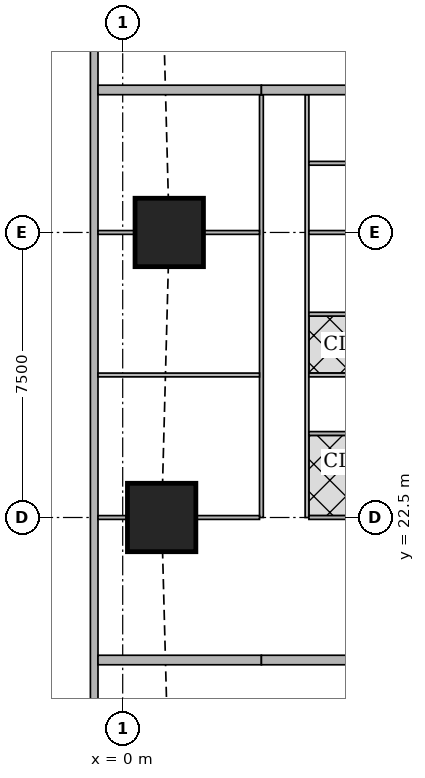
"""IFC4 building model, lengths in metres.
Left out: names, types, materials, properties, quantities, classifications, styles, units other than length and angle.
Written with IfcOpenShell. Run it as: python <this file> out.ifc"""

import sys

from ifc_helpers import new_model, si_unit, direction, frame, frame_2d, origin, origin_2d, place, context, subcontext, project, spatial, rectangle, extrude, element, fill, save


model = new_model("IFC4")
c1 = context("Model", 3, precision=1e-05, world=origin(), true_north=direction((0.0, 1.0)))
c2 = subcontext(c1, "Body", "Model", "MODEL_VIEW")
j1 = project(units=[si_unit("LENGTHUNIT", "METRE"), si_unit("PLANEANGLEUNIT", "RADIAN")], contexts=[c1])
p1 = place(None, origin())
s1 = spatial("IfcSite", under=j1, at=p1, CompositionType="ELEMENT")
p2 = place(p1, origin())
s2 = spatial("IfcBuilding", under=s1, at=p2, CompositionType="ELEMENT")
p3 = place(p2, frame((0.0, 0.0, 147.05)))
s3 = spatial("IfcBuildingStorey", under=s2, at=p3, CompositionType="ELEMENT", Elevation=147.05)
for number, where, z_axis, x_axis in (
    (1, (1.025, 22.5, 0.0), (0.0, 0.0, 1.0), (1.0, 0.0, 0.0)),
    (2, (1.225, 30.0, 0.0), (0.0, 0.0, 1.0), (1.0, 0.0, 0.0)),
):
    element("IfcColumn", number, at=place(p3, frame(where, z_axis=z_axis, x_axis=x_axis)), inside=s3, PredefinedType="COLUMN", context=c2, shape_type="SweptSolid", body=[
        extrude(rectangle(XDim=1.8, YDim=1.8, at=origin_2d()), origin(), (0.0, 0.0, 1.0), 3.75),
    ])
p4 = place(p3, frame((-0.75, 42.837, 0.0), z_axis=(0.0, 0.0, 1.0), x_axis=(0.0, -1.0, 0.0)))
e3 = element("IfcWall", 3, at=p4, inside=s3, PredefinedType="SOLIDWALL", context=c2, shape_type="SweptSolid", body=[
    extrude(rectangle(XDim=40.674, YDim=0.2, at=frame_2d((20.337, 0.0))), origin(), (0.0, 0.0, 1.0), 3.5),
])
p5 = place(p4, frame((1.78, 0.0, 0.9)))
e4 = element("IfcOpeningElement", 4, at=p5, cuts=e3, PredefinedType="OPENING", context=c2, shape_type="SweptSolid", body=[
    extrude(rectangle(XDim=1.8, YDim=1.5, at=frame_2d((0.9, 0.75))), frame((0.0, 0.11, 0.0), z_axis=(0.0, -1.0, 0.0), x_axis=(1.0, 0.0, 0.0)), (0.0, 0.0, 1.0), 0.22),
])
p6 = place(p4, frame((6.312, 0.0, 0.9)))
e5 = element("IfcOpeningElement", 5, at=p6, cuts=e3, PredefinedType="OPENING", context=c2, shape_type="SweptSolid", body=[
    extrude(rectangle(XDim=1.8, YDim=1.5, at=frame_2d((0.9, 0.75))), frame((0.0, 0.11, 0.0), z_axis=(0.0, -1.0, 0.0), x_axis=(1.0, 0.0, 0.0)), (0.0, 0.0, 1.0), 0.22),
])
p7 = place(p4, frame((10.062, 0.0, 0.9)))
e6 = element("IfcOpeningElement", 6, at=p7, cuts=e3, PredefinedType="OPENING", context=c2, shape_type="SweptSolid", body=[
    extrude(rectangle(XDim=1.8, YDim=1.5, at=frame_2d((0.9, 0.75))), frame((0.0, 0.11, 0.0), z_axis=(0.0, -1.0, 0.0), x_axis=(1.0, 0.0, 0.0)), (0.0, 0.0, 1.0), 0.22),
])
p8 = place(p4, frame((13.812, 0.0, 0.9)))
e7 = element("IfcOpeningElement", 7, at=p8, cuts=e3, PredefinedType="OPENING", context=c2, shape_type="SweptSolid", body=[
    extrude(rectangle(XDim=1.8, YDim=1.5, at=frame_2d((0.9, 0.75))), frame((0.0, 0.11, 0.0), z_axis=(0.0, -1.0, 0.0), x_axis=(1.0, 0.0, 0.0)), (0.0, 0.0, 1.0), 0.22),
])
p9 = place(p4, frame((17.562, 0.0, 0.9)))
e8 = element("IfcOpeningElement", 8, at=p9, cuts=e3, PredefinedType="OPENING", context=c2, shape_type="SweptSolid", body=[
    extrude(rectangle(XDim=1.8, YDim=1.5, at=frame_2d((0.9, 0.75))), frame((0.0, 0.11, 0.0), z_axis=(0.0, -1.0, 0.0), x_axis=(1.0, 0.0, 0.0)), (0.0, 0.0, 1.0), 0.22),
])
p10 = place(p4, frame((21.312, 0.0, 0.9)))
e9 = element("IfcOpeningElement", 9, at=p10, cuts=e3, PredefinedType="OPENING", context=c2, shape_type="SweptSolid", body=[
    extrude(rectangle(XDim=1.8, YDim=1.5, at=frame_2d((0.9, 0.75))), frame((0.0, 0.11, 0.0), z_axis=(0.0, -1.0, 0.0), x_axis=(1.0, 0.0, 0.0)), (0.0, 0.0, 1.0), 0.22),
])
p11 = place(p4, frame((25.062, 0.0, 0.9)))
e10 = element("IfcOpeningElement", 10, at=p11, cuts=e3, PredefinedType="OPENING", context=c2, shape_type="SweptSolid", body=[
    extrude(rectangle(XDim=1.8, YDim=1.5, at=frame_2d((0.9, 0.75))), frame((0.0, 0.11, 0.0), z_axis=(0.0, -1.0, 0.0), x_axis=(1.0, 0.0, 0.0)), (0.0, 0.0, 1.0), 0.22),
])
p12 = place(p4, frame((28.812, 0.0, 0.9)))
e11 = element("IfcOpeningElement", 11, at=p12, cuts=e3, PredefinedType="OPENING", context=c2, shape_type="SweptSolid", body=[
    extrude(rectangle(XDim=1.8, YDim=1.5, at=frame_2d((0.9, 0.75))), frame((0.0, 0.11, 0.0), z_axis=(0.0, -1.0, 0.0), x_axis=(1.0, 0.0, 0.0)), (0.0, 0.0, 1.0), 0.22),
])
p13 = place(p4, frame((32.562, 0.0, 0.9)))
e12 = element("IfcOpeningElement", 12, at=p13, cuts=e3, PredefinedType="OPENING", context=c2, shape_type="SweptSolid", body=[
    extrude(rectangle(XDim=1.8, YDim=1.5, at=frame_2d((0.9, 0.75))), frame((0.0, 0.11, 0.0), z_axis=(0.0, -1.0, 0.0), x_axis=(1.0, 0.0, 0.0)), (0.0, 0.0, 1.0), 0.22),
])
p14 = place(p4, frame((37.094, 0.0, 0.9)))
e13 = element("IfcOpeningElement", 13, at=p14, cuts=e3, PredefinedType="OPENING", context=c2, shape_type="SweptSolid", body=[
    extrude(rectangle(XDim=1.8, YDim=1.5, at=frame_2d((0.9, 0.75))), frame((0.0, 0.11, 0.0), z_axis=(0.0, -1.0, 0.0), x_axis=(1.0, 0.0, 0.0)), (0.0, 0.0, 1.0), 0.22),
])
p15 = place(p3, frame((3.65, 22.5, 0.0), z_axis=(0.0, 0.0, 1.0), x_axis=(0.0, 1.0, 0.0)))
e14 = element("IfcWall", 14, at=p15, inside=s3, PredefinedType="PARTITIONING", context=c2, shape_type="SweptSolid", body=[
    extrude(rectangle(XDim=11.125, YDim=0.1, at=frame_2d((5.562, 0.0))), origin(), (0.0, 0.0, 1.0), 3.5),
])
p16 = place(p15, frame((0.2, 0.0, 0.0)))
e15 = element("IfcOpeningElement", 15, at=p16, cuts=e14, PredefinedType="OPENING", context=c2, shape_type="SweptSolid", body=[
    extrude(rectangle(XDim=0.9, YDim=2.1, at=frame_2d((0.45, 1.05))), frame((0.0, 0.06, 0.0), z_axis=(0.0, -1.0, 0.0), x_axis=(1.0, 0.0, 0.0)), (0.0, 0.0, 1.0), 0.12),
])
p17 = place(p15, frame((3.95, 0.0, 0.0)))
e16 = element("IfcOpeningElement", 16, at=p17, cuts=e14, PredefinedType="OPENING", context=c2, shape_type="SweptSolid", body=[
    extrude(rectangle(XDim=0.9, YDim=2.1, at=frame_2d((0.45, 1.05))), frame((0.0, 0.06, 0.0), z_axis=(0.0, -1.0, 0.0), x_axis=(1.0, 0.0, 0.0)), (0.0, 0.0, 1.0), 0.12),
])
p18 = place(p15, frame((7.7, 0.0, 0.0)))
e17 = element("IfcOpeningElement", 17, at=p18, cuts=e14, PredefinedType="OPENING", context=c2, shape_type="SweptSolid", body=[
    extrude(rectangle(XDim=0.9, YDim=2.1, at=frame_2d((0.45, 1.05))), frame((0.0, 0.06, 0.0), z_axis=(0.0, -1.0, 0.0), x_axis=(1.0, 0.0, 0.0)), (0.0, 0.0, 1.0), 0.12),
])
p19 = place(p3, frame((4.85, 22.5, 0.0), z_axis=(0.0, 0.0, 1.0), x_axis=(0.0, 1.0, 0.0)))
e18 = element("IfcWall", 18, at=p19, inside=s3, PredefinedType="PARTITIONING", context=c2, shape_type="SweptSolid", body=[
    extrude(rectangle(XDim=11.125, YDim=0.1, at=frame_2d((5.562, 0.0))), origin(), (0.0, 0.0, 1.0), 3.5),
])
p20 = place(p19, frame((0.655, 0.0, 0.0)))
e19 = element("IfcOpeningElement", 19, at=p20, cuts=e18, PredefinedType="OPENING", context=c2, shape_type="SweptSolid", body=[
    extrude(rectangle(XDim=0.9, YDim=2.1, at=frame_2d((0.45, 1.05))), frame((0.0, 0.06, 0.0), z_axis=(0.0, -1.0, 0.0), x_axis=(1.0, 0.0, 0.0)), (0.0, 0.0, 1.0), 0.12),
])
p21 = place(p19, frame((4.1, 0.0, 0.0)))
e20 = element("IfcOpeningElement", 20, at=p21, cuts=e18, PredefinedType="OPENING", context=c2, shape_type="SweptSolid", body=[
    extrude(rectangle(XDim=0.9, YDim=2.1, at=frame_2d((0.45, 1.05))), frame((0.0, 0.06, 0.0), z_axis=(0.0, -1.0, 0.0), x_axis=(1.0, 0.0, 0.0)), (0.0, 0.0, 1.0), 0.12),
])
p22 = place(p19, frame((7.96, 0.0, 0.0)))
e21 = element("IfcOpeningElement", 21, at=p22, cuts=e18, PredefinedType="OPENING", context=c2, shape_type="SweptSolid", body=[
    extrude(rectangle(XDim=0.9, YDim=2.1, at=frame_2d((0.45, 1.05))), frame((0.0, 0.06, 0.0), z_axis=(0.0, -1.0, 0.0), x_axis=(1.0, 0.0, 0.0)), (0.0, 0.0, 1.0), 0.12),
])
p23 = place(p19, frame((2.53, 0.0, 0.0)))
e22 = element("IfcOpeningElement", 22, at=p23, cuts=e18, PredefinedType="OPENING", context=c2, shape_type="SweptSolid", body=[
    extrude(rectangle(XDim=0.9, YDim=2.1, at=frame_2d((0.45, 1.05))), frame((0.0, 0.06, 0.0), z_axis=(0.0, -1.0, 0.0), x_axis=(1.0, 0.0, 0.0)), (0.0, 0.0, 1.0), 0.12),
])
p24 = place(p19, frame((5.975, 0.0, 0.0)))
e23 = element("IfcOpeningElement", 23, at=p24, cuts=e18, PredefinedType="OPENING", context=c2, shape_type="SweptSolid", body=[
    extrude(rectangle(XDim=0.9, YDim=2.1, at=frame_2d((0.45, 1.05))), frame((0.0, 0.06, 0.0), z_axis=(0.0, -1.0, 0.0), x_axis=(1.0, 0.0, 0.0)), (0.0, 0.0, 1.0), 0.12),
])
p25 = place(p19, frame((9.835, 0.0, 0.0)))
e24 = element("IfcOpeningElement", 24, at=p25, cuts=e18, PredefinedType="OPENING", context=c2, shape_type="SweptSolid", body=[
    extrude(rectangle(XDim=0.9, YDim=2.1, at=frame_2d((0.45, 1.05))), frame((0.0, 0.06, 0.0), z_axis=(0.0, -1.0, 0.0), x_axis=(1.0, 0.0, 0.0)), (0.0, 0.0, 1.0), 0.12),
])
p26 = place(p3, frame((-0.65, 22.5, 0.0), z_axis=(0.0, 0.0, 1.0), x_axis=(1.0, 0.0, 0.0)))
e25 = element("IfcWall", 25, at=p26, inside=s3, PredefinedType="PARTITIONING", context=c2, shape_type="SweptSolid", body=[
    extrude(rectangle(XDim=0.774, YDim=0.1, at=frame_2d((0.387, 0.0))), origin(), (0.0, 0.0, 1.0), 3.5),
])
p27 = place(p3, frame((1.926, 22.5, 0.0), z_axis=(0.0, 0.0, 1.0), x_axis=(1.0, 0.0, 0.0)))
e26 = element("IfcWall", 26, at=p27, inside=s3, PredefinedType="PARTITIONING", context=c2, shape_type="SweptSolid", body=[
    extrude(rectangle(XDim=1.674, YDim=0.1, at=frame_2d((0.837, 0.0))), origin(), (0.0, 0.0, 1.0), 3.5),
])
p28 = place(p3, frame((-0.65, 26.25, 0.0), z_axis=(0.0, 0.0, 1.0), x_axis=(1.0, 0.0, 0.0)))
e27 = element("IfcWall", 27, at=p28, inside=s3, PredefinedType="PARTITIONING", context=c2, shape_type="SweptSolid", body=[
    extrude(rectangle(XDim=4.25, YDim=0.1, at=frame_2d((2.125, 0.0))), origin(), (0.0, 0.0, 1.0), 2.1),
])
p29 = place(p3, frame((-0.65, 30.0, 0.0), z_axis=(0.0, 0.0, 1.0), x_axis=(1.0, 0.0, 0.0)))
e28 = element("IfcWall", 28, at=p29, inside=s3, PredefinedType="PARTITIONING", context=c2, shape_type="SweptSolid", body=[
    extrude(rectangle(XDim=0.974, YDim=0.1, at=frame_2d((0.487, 0.0))), origin(), (0.0, 0.0, 1.0), 3.5),
])
p30 = place(p3, frame((2.126, 30.0, 0.0), z_axis=(0.0, 0.0, 1.0), x_axis=(1.0, 0.0, 0.0)))
e29 = element("IfcWall", 29, at=p30, inside=s3, PredefinedType="PARTITIONING", context=c2, shape_type="SweptSolid", body=[
    extrude(rectangle(XDim=1.474, YDim=0.1, at=frame_2d((0.737, 0.0))), origin(), (0.0, 0.0, 1.0), 3.5),
])
p31 = place(p3, frame((4.9, 22.5, 0.0), z_axis=(0.0, 0.0, 1.0), x_axis=(1.0, 0.0, 0.0)))
e30 = element("IfcWall", 30, at=p31, inside=s3, PredefinedType="PARTITIONING", context=c2, shape_type="SweptSolid", body=[
    extrude(rectangle(XDim=1.549, YDim=0.1, at=frame_2d((0.774, 0.0))), origin(), (0.0, 0.0, 1.0), 3.5),
])
p32 = place(p3, frame((4.9, 26.25, 0.0), z_axis=(0.0, 0.0, 1.0), x_axis=(1.0, 0.0, 0.0)))
e31 = element("IfcWall", 31, at=p32, inside=s3, PredefinedType="PARTITIONING", context=c2, shape_type="SweptSolid", body=[
    extrude(rectangle(XDim=3.275, YDim=0.1, at=frame_2d((1.638, 0.0))), origin(), (0.0, 0.0, 1.0), 3.5),
])
p33 = place(p3, frame((4.9, 30.0, 0.0), z_axis=(0.0, 0.0, 1.0), x_axis=(1.0, 0.0, 0.0)))
e32 = element("IfcWall", 32, at=p33, inside=s3, PredefinedType="PARTITIONING", context=c2, shape_type="SweptSolid", body=[
    extrude(rectangle(XDim=1.549, YDim=0.1, at=frame_2d((0.774, 0.0))), origin(), (0.0, 0.0, 1.0), 3.5),
])
for number, where, z_axis, x_axis in (
    (33, (4.9, 24.71, 0.0), (0.0, 0.0, 1.0), (1.0, 0.0, 0.0)),
    (34, (4.9, 27.85, 0.0), (0.0, 0.0, 1.0), (1.0, 0.0, 0.0)),
    (35, (4.9, 31.82, 0.0), (0.0, 0.0, 1.0), (1.0, 0.0, 0.0)),
):
    element("IfcWall", number, at=place(p3, frame(where, z_axis=z_axis, x_axis=x_axis)), inside=s3, PredefinedType="PARTITIONING", context=c2, shape_type="SweptSolid", body=[
        extrude(rectangle(XDim=3.275, YDim=0.1, at=frame_2d((1.638, 0.0))), origin(), (0.0, 0.0, 1.0), 3.5),
    ])
p34 = place(p3, frame((-0.65, 18.75, 0.0), z_axis=(0.0, 0.0, 1.0), x_axis=(1.0, 0.0, 0.0)))
e36 = element("IfcWall", 36, at=p34, inside=s3, PredefinedType="SOLIDWALL", context=c2, shape_type="SweptSolid", body=[
    extrude(rectangle(XDim=4.3, YDim=0.25, at=frame_2d((2.15, 0.0))), origin(), (0.0, 0.0, 1.0), 2.1),
])
p35 = place(p3, frame((3.65, 18.75, 0.0), z_axis=(0.0, 0.0, 1.0), x_axis=(1.0, 0.0, 0.0)))
e37 = element("IfcWall", 37, at=p35, inside=s3, PredefinedType="SOLIDWALL", context=c2, shape_type="SweptSolid", body=[
    extrude(rectangle(XDim=4.525, YDim=0.25, at=frame_2d((2.263, 0.0))), origin(), (0.0, 0.0, 1.0), 3.5),
])
p36 = place(p3, frame((-0.65, 33.75, 0.0), z_axis=(0.0, 0.0, 1.0), x_axis=(1.0, 0.0, 0.0)))
e38 = element("IfcWall", 38, at=p36, inside=s3, PredefinedType="SOLIDWALL", context=c2, shape_type="SweptSolid", body=[
    extrude(rectangle(XDim=4.3, YDim=0.25, at=frame_2d((2.15, 0.0))), origin(), (0.0, 0.0, 1.0), 2.1),
])
p37 = place(p3, frame((3.65, 33.75, 0.0), z_axis=(0.0, 0.0, 1.0), x_axis=(1.0, 0.0, 0.0)))
e39 = element("IfcWall", 39, at=p37, inside=s3, PredefinedType="SOLIDWALL", context=c2, shape_type="SweptSolid", body=[
    extrude(rectangle(XDim=4.525, YDim=0.25, at=frame_2d((2.263, 0.0))), origin(), (0.0, 0.0, 1.0), 3.5),
])
p38 = place(p6, origin())
e40 = element("IfcWindow", 40, at=p38, inside=s3, PartitioningType="SINGLE_PANEL", PredefinedType="WINDOW", context=c2, shape_type="SweptSolid", body=[
    extrude(rectangle(XDim=1.8, YDim=1.5, at=frame_2d((0.9, 0.75))), frame((0.0, 0.03, 0.0), z_axis=(0.0, -1.0, 0.0), x_axis=(1.0, 0.0, 0.0)), (0.0, 0.0, 1.0), 0.06),
])
fill(e5, e40)
p39 = place(p7, origin())
e41 = element("IfcWindow", 41, at=p39, inside=s3, PartitioningType="SINGLE_PANEL", PredefinedType="WINDOW", context=c2, shape_type="SweptSolid", body=[
    extrude(rectangle(XDim=1.8, YDim=1.5, at=frame_2d((0.9, 0.75))), frame((0.0, 0.03, 0.0), z_axis=(0.0, -1.0, 0.0), x_axis=(1.0, 0.0, 0.0)), (0.0, 0.0, 1.0), 0.06),
])
fill(e6, e41)
p40 = place(p8, origin())
e42 = element("IfcWindow", 42, at=p40, inside=s3, PartitioningType="SINGLE_PANEL", PredefinedType="WINDOW", context=c2, shape_type="SweptSolid", body=[
    extrude(rectangle(XDim=1.8, YDim=1.5, at=frame_2d((0.9, 0.75))), frame((0.0, 0.03, 0.0), z_axis=(0.0, -1.0, 0.0), x_axis=(1.0, 0.0, 0.0)), (0.0, 0.0, 1.0), 0.06),
])
fill(e7, e42)
p41 = place(p9, origin())
e43 = element("IfcWindow", 43, at=p41, inside=s3, PartitioningType="SINGLE_PANEL", PredefinedType="WINDOW", context=c2, shape_type="SweptSolid", body=[
    extrude(rectangle(XDim=1.8, YDim=1.5, at=frame_2d((0.9, 0.75))), frame((0.0, 0.03, 0.0), z_axis=(0.0, -1.0, 0.0), x_axis=(1.0, 0.0, 0.0)), (0.0, 0.0, 1.0), 0.06),
])
fill(e8, e43)
p42 = place(p10, origin())
e44 = element("IfcWindow", 44, at=p42, inside=s3, PartitioningType="SINGLE_PANEL", PredefinedType="WINDOW", context=c2, shape_type="SweptSolid", body=[
    extrude(rectangle(XDim=1.8, YDim=1.5, at=frame_2d((0.9, 0.75))), frame((0.0, 0.03, 0.0), z_axis=(0.0, -1.0, 0.0), x_axis=(1.0, 0.0, 0.0)), (0.0, 0.0, 1.0), 0.06),
])
fill(e9, e44)
p43 = place(p11, origin())
e45 = element("IfcWindow", 45, at=p43, inside=s3, PartitioningType="SINGLE_PANEL", PredefinedType="WINDOW", context=c2, shape_type="SweptSolid", body=[
    extrude(rectangle(XDim=1.8, YDim=1.5, at=frame_2d((0.9, 0.75))), frame((0.0, 0.03, 0.0), z_axis=(0.0, -1.0, 0.0), x_axis=(1.0, 0.0, 0.0)), (0.0, 0.0, 1.0), 0.06),
])
fill(e10, e45)
p44 = place(p16, origin())
e46 = element("IfcDoor", 46, at=p44, inside=s3, OperationType="SINGLE_SWING_LEFT", PredefinedType="DOOR", context=c2, shape_type="SweptSolid", body=[
    extrude(rectangle(XDim=0.9, YDim=2.1, at=frame_2d((0.45, 1.05))), frame((0.0, 0.025, 0.0), z_axis=(0.0, -1.0, 0.0), x_axis=(1.0, 0.0, 0.0)), (0.0, 0.0, 1.0), 0.05),
])
fill(e15, e46)
p45 = place(p17, origin())
e47 = element("IfcDoor", 47, at=p45, inside=s3, OperationType="SINGLE_SWING_LEFT", PredefinedType="DOOR", context=c2, shape_type="SweptSolid", body=[
    extrude(rectangle(XDim=0.9, YDim=2.1, at=frame_2d((0.45, 1.05))), frame((0.0, 0.025, 0.0), z_axis=(0.0, -1.0, 0.0), x_axis=(1.0, 0.0, 0.0)), (0.0, 0.0, 1.0), 0.05),
])
fill(e16, e47)
p46 = place(p18, origin())
e48 = element("IfcDoor", 48, at=p46, inside=s3, OperationType="SINGLE_SWING_LEFT", PredefinedType="DOOR", context=c2, shape_type="SweptSolid", body=[
    extrude(rectangle(XDim=0.9, YDim=2.1, at=frame_2d((0.45, 1.05))), frame((0.0, 0.025, 0.0), z_axis=(0.0, -1.0, 0.0), x_axis=(1.0, 0.0, 0.0)), (0.0, 0.0, 1.0), 0.05),
])
fill(e17, e48)
p47 = place(p20, origin())
e49 = element("IfcDoor", 49, at=p47, inside=s3, OperationType="SINGLE_SWING_RIGHT", PredefinedType="DOOR", context=c2, shape_type="SweptSolid", body=[
    extrude(rectangle(XDim=0.9, YDim=2.1, at=frame_2d((0.45, 1.05))), frame((0.0, 0.025, 0.0), z_axis=(0.0, -1.0, 0.0), x_axis=(1.0, 0.0, 0.0)), (0.0, 0.0, 1.0), 0.05),
])
fill(e19, e49)
p48 = place(p21, origin())
e50 = element("IfcDoor", 50, at=p48, inside=s3, OperationType="SINGLE_SWING_RIGHT", PredefinedType="DOOR", context=c2, shape_type="SweptSolid", body=[
    extrude(rectangle(XDim=0.9, YDim=2.1, at=frame_2d((0.45, 1.05))), frame((0.0, 0.025, 0.0), z_axis=(0.0, -1.0, 0.0), x_axis=(1.0, 0.0, 0.0)), (0.0, 0.0, 1.0), 0.05),
])
fill(e20, e50)
p49 = place(p22, origin())
e51 = element("IfcDoor", 51, at=p49, inside=s3, OperationType="SINGLE_SWING_RIGHT", PredefinedType="DOOR", context=c2, shape_type="SweptSolid", body=[
    extrude(rectangle(XDim=0.9, YDim=2.1, at=frame_2d((0.45, 1.05))), frame((0.0, 0.025, 0.0), z_axis=(0.0, -1.0, 0.0), x_axis=(1.0, 0.0, 0.0)), (0.0, 0.0, 1.0), 0.05),
])
fill(e21, e51)
p50 = place(p23, origin())
e52 = element("IfcDoor", 52, at=p50, inside=s3, OperationType="SINGLE_SWING_LEFT", PredefinedType="DOOR", context=c2, shape_type="SweptSolid", body=[
    extrude(rectangle(XDim=0.9, YDim=2.1, at=frame_2d((0.45, 1.05))), frame((0.0, 0.025, 0.0), z_axis=(0.0, -1.0, 0.0), x_axis=(1.0, 0.0, 0.0)), (0.0, 0.0, 1.0), 0.05),
])
fill(e22, e52)
p51 = place(p24, origin())
e53 = element("IfcDoor", 53, at=p51, inside=s3, OperationType="SINGLE_SWING_LEFT", PredefinedType="DOOR", context=c2, shape_type="SweptSolid", body=[
    extrude(rectangle(XDim=0.9, YDim=2.1, at=frame_2d((0.45, 1.05))), frame((0.0, 0.025, 0.0), z_axis=(0.0, -1.0, 0.0), x_axis=(1.0, 0.0, 0.0)), (0.0, 0.0, 1.0), 0.05),
])
fill(e23, e53)
p52 = place(p25, origin())
e54 = element("IfcDoor", 54, at=p52, inside=s3, OperationType="SINGLE_SWING_LEFT", PredefinedType="DOOR", context=c2, shape_type="SweptSolid", body=[
    extrude(rectangle(XDim=0.9, YDim=2.1, at=frame_2d((0.45, 1.05))), frame((0.0, 0.025, 0.0), z_axis=(0.0, -1.0, 0.0), x_axis=(1.0, 0.0, 0.0)), (0.0, 0.0, 1.0), 0.05),
])
fill(e24, e54)
save(model, sys.argv[1])
